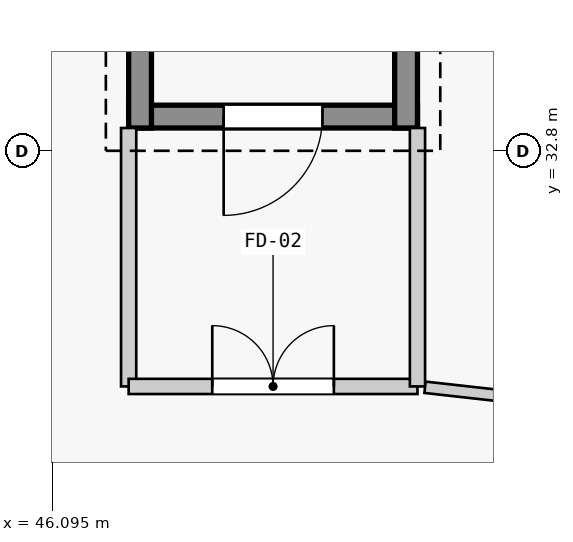
"""IFC4 building model, lengths in metres.
Left out: names, types, materials, properties, quantities, classifications, styles, units other than length and angle.
Written with IfcOpenShell. Run it as: python <this file> out.ifc"""

import sys

from ifc_helpers import new_model, si_unit, direction, frame, frame_2d, origin, place, context, subcontext, project, spatial, rectangle, extrude, element, fill, save


model = new_model("IFC4")
c1 = context("Model", 3, precision=1e-05, world=origin(), true_north=direction((0.0, 1.0)))
c2 = subcontext(c1, "Body", "Model", "MODEL_VIEW")
j1 = project(units=[si_unit("LENGTHUNIT", "METRE"), si_unit("PLANEANGLEUNIT", "RADIAN")], contexts=[c1])
p1 = place(None, origin())
s1 = spatial("IfcSite", under=j1, at=p1, CompositionType="ELEMENT")
p2 = place(p1, origin())
s2 = spatial("IfcBuilding", under=s1, at=p2, CompositionType="ELEMENT")
p3 = place(p2, origin())
s3 = spatial("IfcBuildingStorey", under=s2, at=p3, CompositionType="ELEMENT", Elevation=0.0)
p4 = place(p3, frame((50.9, 33.25, 0.0), z_axis=(0.0, 0.0, 1.0), x_axis=(-1.0, 0.0, 0.0)))
e1 = element("IfcWall", 1, at=p4, inside=s3, PredefinedType="SHEAR", context=c2, shape_type="SweptSolid", body=[
    extrude(rectangle(XDim=3.8, YDim=0.3, at=frame_2d((1.9, 0.0))), origin(), (0.0, 0.0, 1.0), 5.14),
])
p5 = place(p4, frame((1.25, 0.0, 0.0)))
e2 = element("IfcOpeningElement", 2, at=p5, cuts=e1, PredefinedType="OPENING", context=c2, shape_type="SweptSolid", body=[
    extrude(rectangle(XDim=1.3, YDim=2.2, at=frame_2d((0.65, 1.1))), frame((0.0, 0.16, 0.0), z_axis=(0.0, -1.0, 0.0), x_axis=(1.0, 0.0, 0.0)), (0.0, 0.0, 1.0), 0.32),
])
for number, where, z_axis, x_axis in (
    (3, (47.25, 33.1, 0.0), (0.0, 0.0, 1.0), (0.0, 1.0, 0.0)),
    (4, (50.75, 41.2, 0.0), (0.0, 0.0, 1.0), (0.0, -1.0, 0.0)),
):
    element("IfcWall", number, at=place(p3, frame(where, z_axis=z_axis, x_axis=x_axis)), inside=s3, PredefinedType="SHEAR", context=c2, shape_type="SweptSolid", body=[
        extrude(rectangle(XDim=8.1, YDim=0.3, at=frame_2d((4.05, 0.0))), origin(), (0.0, 0.0, 1.0), 5.14),
    ])
p6 = place(p3, frame((47.1, 33.1, 0.0), z_axis=(0.0, 0.0, 1.0), x_axis=(0.0, -1.0, 0.0)))
e5 = element("IfcWall", 5, at=p6, inside=s3, PredefinedType="STANDARD", context=c2, shape_type="SweptSolid", body=[
    extrude(rectangle(XDim=3.4, YDim=0.2, at=frame_2d((1.7, 0.0))), origin(), (0.0, 0.0, 1.0), 4.32),
])
p7 = place(p3, frame((47.1, 29.7, 0.0), z_axis=(0.0, 0.0, 1.0), x_axis=(1.0, 0.0, 0.0)))
e6 = element("IfcWall", 6, at=p7, inside=s3, PredefinedType="STANDARD", context=c2, shape_type="SweptSolid", body=[
    extrude(rectangle(XDim=3.8, YDim=0.2, at=frame_2d((1.9, 0.0))), origin(), (0.0, 0.0, 1.0), 5.14),
])
p8 = place(p7, frame((1.1, 0.0, 0.0)))
e7 = element("IfcOpeningElement", 7, at=p8, cuts=e6, PredefinedType="OPENING", context=c2, shape_type="SweptSolid", body=[
    extrude(rectangle(XDim=1.6, YDim=2.2, at=frame_2d((0.8, 1.1))), frame((0.0, 0.11, 0.0), z_axis=(0.0, -1.0, 0.0), x_axis=(1.0, 0.0, 0.0)), (0.0, 0.0, 1.0), 0.22),
])
p9 = place(p3, frame((50.9, 29.7, 0.0), z_axis=(0.0, 0.0, 1.0), x_axis=(0.0, 1.0, 0.0)))
e8 = element("IfcWall", 8, at=p9, inside=s3, PredefinedType="STANDARD", context=c2, shape_type="SweptSolid", body=[
    extrude(rectangle(XDim=3.4, YDim=0.2, at=frame_2d((1.7, 0.0))), origin(), (0.0, 0.0, 1.0), 4.32),
])
p10 = place(p3, frame((54.01, 29.352, 0.0), z_axis=(0.0, 0.0, 1.0), x_axis=(-0.993797943002, 0.111200937431, 0.0)))
e9 = element("IfcWall", 9, at=p10, inside=s3, PredefinedType="PARTITIONING", context=c2, shape_type="SweptSolid", body=[
    extrude(rectangle(XDim=3.03, YDim=0.15, at=frame_2d((1.515, 0.0))), origin(), (0.0, 0.0, 1.0), 4.47),
])
p11 = place(p5, origin())
e10 = element("IfcDoor", 10, at=p11, inside=s3, OperationType="SINGLE_SWING_RIGHT", PredefinedType="DOOR", context=c2, shape_type="SweptSolid", body=[
    extrude(rectangle(XDim=1.3, YDim=2.2, at=frame_2d((0.65, 1.1))), frame((0.0, 0.025, 0.0), z_axis=(0.0, -1.0, 0.0), x_axis=(1.0, 0.0, 0.0)), (0.0, 0.0, 1.0), 0.05),
])
fill(e2, e10)
p12 = place(p8, origin())
e11 = element("IfcDoor", 11, at=p12, inside=s3, OperationType="DOUBLE_DOOR_SINGLE_SWING", PredefinedType="DOOR", context=c2, shape_type="SweptSolid", body=[
    extrude(rectangle(XDim=1.6, YDim=2.2, at=frame_2d((0.8, 1.1))), frame((0.0, 0.025, 0.0), z_axis=(0.0, -1.0, 0.0), x_axis=(1.0, 0.0, 0.0)), (0.0, 0.0, 1.0), 0.05),
])
fill(e7, e11)
save(model, sys.argv[1])
